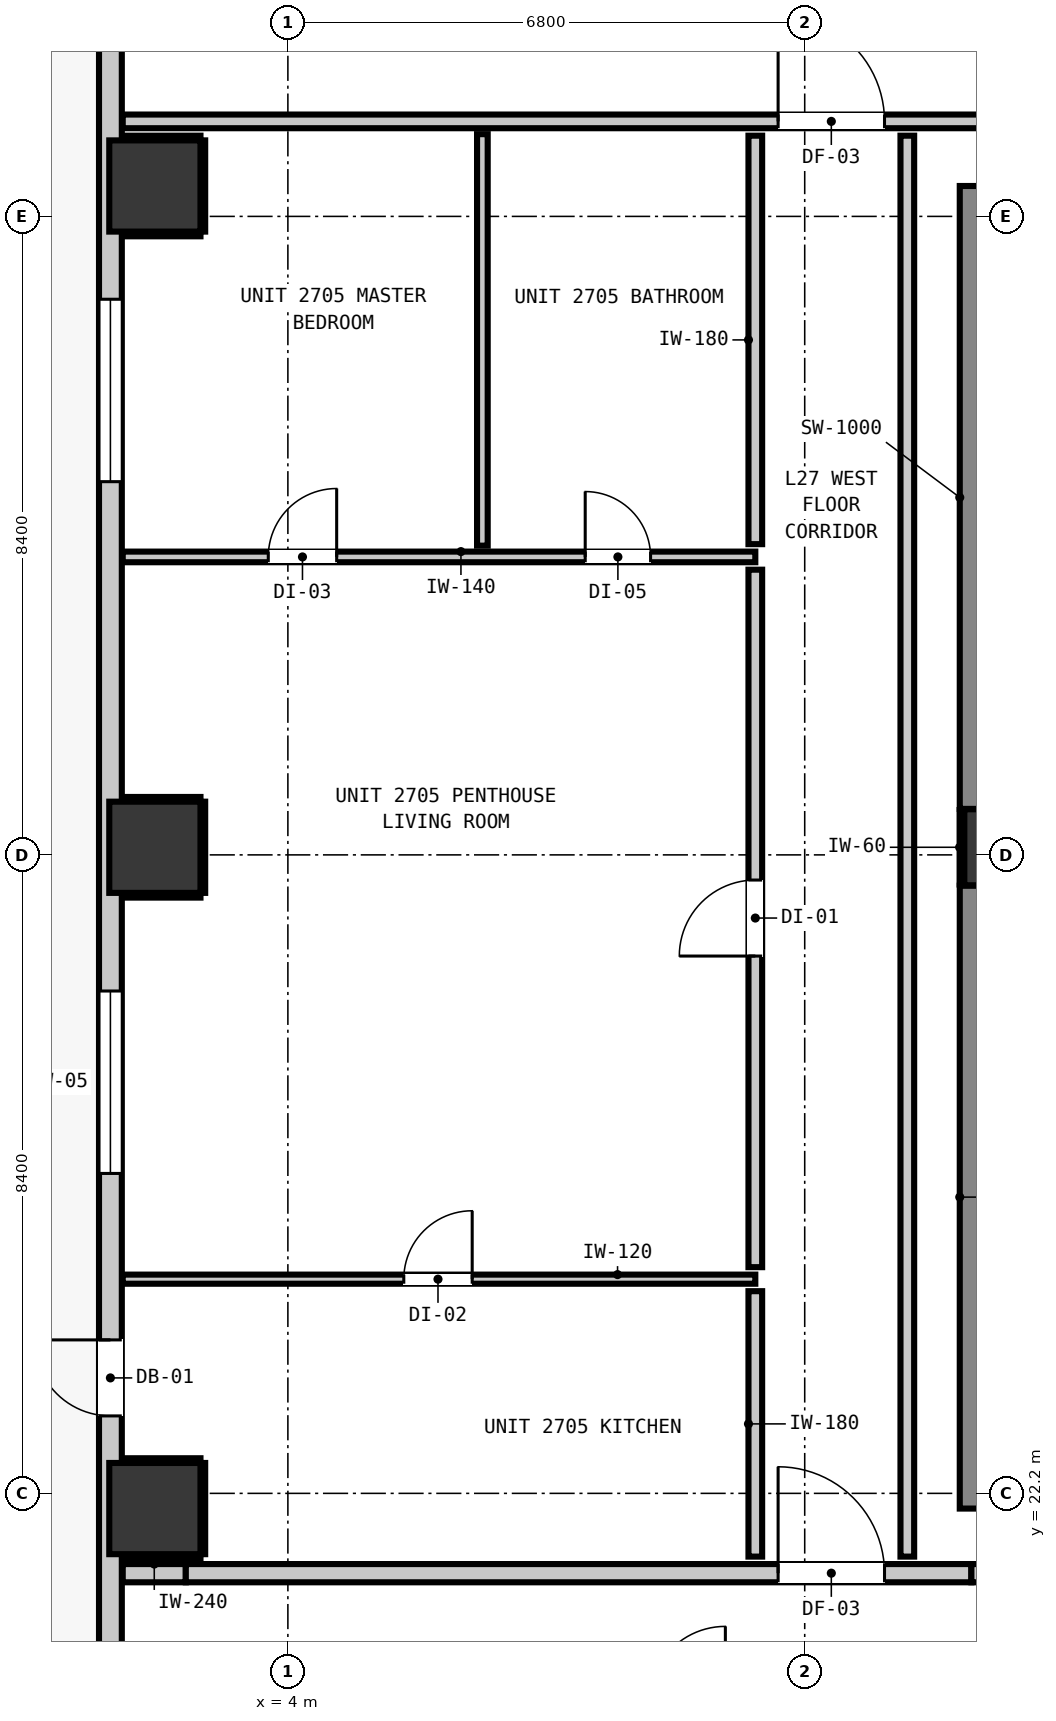
"""IFC4 building model, lengths in metres.
Left out: names, types, materials, properties, quantities, classifications, styles, units other than length and angle.
Written with IfcOpenShell. Run it as: python <this file> out.ifc"""

import sys

from ifc_helpers import new_model, si_unit, direction, frame, frame_2d, origin, origin_2d, place, context, subcontext, project, spatial, rectangle, extrude, element, fill, save


model = new_model("IFC4")
c1 = context("Model", 3, precision=1e-05, world=origin(), true_north=direction((0.0, 1.0)))
c2 = subcontext(c1, "Body", "Model", "MODEL_VIEW")
j1 = project(units=[si_unit("LENGTHUNIT", "METRE"), si_unit("PLANEANGLEUNIT", "RADIAN")], contexts=[c1])
p1 = place(None, origin())
s1 = spatial("IfcSite", under=j1, at=p1, CompositionType="ELEMENT")
p2 = place(p1, origin())
s2 = spatial("IfcBuilding", under=s1, at=p2, CompositionType="ELEMENT")
p3 = place(p2, frame((0.0, 0.0, 96.12)))
s3 = spatial("IfcBuildingStorey", under=s2, at=p3, CompositionType="ELEMENT", Elevation=96.12)
p4 = place(p3, frame((13.4, 30.7, 0.0), z_axis=(0.0, 0.0, 1.0), x_axis=(1.0, 0.0, 0.0)))
e1 = element("IfcColumn", 1, at=p4, inside=s3, PredefinedType="COLUMN", context=c2, shape_type="SweptSolid", body=[
    extrude(rectangle(XDim=1.0, YDim=1.0, at=origin_2d()), origin(), (0.0, 0.0, 1.0), 3.32),
])
p5 = place(p3, frame((13.34, 22.0, 0.0), z_axis=(0.0, 0.0, 1.0), x_axis=(0.0, 1.0, 0.0)))
e2 = element("IfcWall", 2, at=p5, inside=s3, PredefinedType="SHEAR", context=c2, shape_type="SweptSolid", body=[
    extrude(rectangle(XDim=8.195, YDim=1.0, at=frame_2d((4.098, 0.0))), origin(), (0.0, 0.0, 1.0), 3.32),
])
p6 = place(p3, frame((13.34, 31.205, 0.0), z_axis=(0.0, 0.0, 1.0), x_axis=(0.0, 1.0, 0.0)))
e3 = element("IfcWall", 3, at=p6, inside=s3, PredefinedType="SHEAR", context=c2, shape_type="SweptSolid", body=[
    extrude(rectangle(XDim=8.195, YDim=1.0, at=frame_2d((4.097, 0.0))), origin(), (0.0, 0.0, 1.0), 3.32),
])
for number, where, z_axis, x_axis in (
    (4, (2.25, 22.0, 0.0), (0.0, 0.0, 1.0), (1.0, 0.0, 0.0)),
    (5, (2.25, 30.7, 0.0), (0.0, 0.0, 1.0), (1.0, 0.0, 0.0)),
    (6, (2.25, 39.4, 0.0), (0.0, 0.0, 1.0), (1.0, 0.0, 0.0)),
):
    element("IfcColumn", number, at=place(p3, frame(where, z_axis=z_axis, x_axis=x_axis)), inside=s3, PredefinedType="COLUMN", context=c2, shape_type="SweptSolid", body=[
        extrude(rectangle(XDim=1.2, YDim=1.2, at=origin_2d()), origin(), (0.0, 0.0, 1.0), 3.32),
    ])
p7 = place(p3, frame((1.665, 16.365, 0.0), z_axis=(0.0, 0.0, 1.0), x_axis=(0.0, 1.0, 0.0)))
e7 = element("IfcWall", 7, at=p7, inside=s3, PredefinedType="STANDARD", context=c2, shape_type="SweptSolid", body=[
    extrude(rectangle(XDim=34.67, YDim=0.3, at=frame_2d((17.335, 0.0))), origin(), (0.0, 0.0, 1.0), 3.06),
])
p8 = place(p7, frame((6.854, 0.0, 0.0)))
e8 = element("IfcOpeningElement", 8, at=p8, cuts=e7, PredefinedType="OPENING", context=c2, shape_type="SweptSolid", body=[
    extrude(rectangle(XDim=1.0, YDim=2.15, at=frame_2d((0.5, 1.075))), frame((0.0, 0.16, 0.0), z_axis=(0.0, -1.0, 0.0), x_axis=(1.0, 0.0, 0.0)), (0.0, 0.0, 1.0), 0.32),
])
p9 = place(p7, frame((32.839, 0.0, 0.85)))
e9 = element("IfcOpeningElement", 9, at=p9, cuts=e7, PredefinedType="OPENING", context=c2, shape_type="SweptSolid", body=[
    extrude(rectangle(XDim=1.05, YDim=1.65, at=frame_2d((0.525, 0.825))), frame((0.0, 0.16, 0.0), z_axis=(0.0, -1.0, 0.0), x_axis=(1.0, 0.0, 0.0)), (0.0, 0.0, 1.0), 0.32),
])
p10 = place(p7, frame((10.044, 0.0, 0.85)))
e10 = element("IfcOpeningElement", 10, at=p10, cuts=e7, PredefinedType="OPENING", context=c2, shape_type="SweptSolid", body=[
    extrude(rectangle(XDim=2.4, YDim=1.95, at=frame_2d((1.2, 0.975))), frame((0.0, 0.16, 0.0), z_axis=(0.0, -1.0, 0.0), x_axis=(1.0, 0.0, 0.0)), (0.0, 0.0, 1.0), 0.32),
])
p11 = place(p7, frame((19.145, 0.0, 0.85)))
e11 = element("IfcOpeningElement", 11, at=p11, cuts=e7, PredefinedType="OPENING", context=c2, shape_type="SweptSolid", body=[
    extrude(rectangle(XDim=2.4, YDim=1.95, at=frame_2d((1.2, 0.975))), frame((0.0, 0.16, 0.0), z_axis=(0.0, -1.0, 0.0), x_axis=(1.0, 0.0, 0.0)), (0.0, 0.0, 1.0), 0.32),
])
p12 = place(p3, frame((1.827, 21.15, 0.0), z_axis=(0.0, 0.0, 1.0), x_axis=(1.0, 0.0, 0.0)))
e12 = element("IfcWall", 12, at=p12, inside=s3, PredefinedType="PARTITIONING", context=c2, shape_type="SweptSolid", body=[
    extrude(rectangle(XDim=0.83, YDim=0.24, at=frame_2d((0.415, 0.0))), origin(), (0.0, 0.0, 1.0), 3.06),
])
p13 = place(p3, frame((2.657, 21.15, 0.0), z_axis=(0.0, 0.0, 1.0), x_axis=(1.0, 0.0, 0.0)))
e13 = element("IfcWall", 13, at=p13, inside=s3, PredefinedType="PARTITIONING", context=c2, shape_type="SweptSolid", body=[
    extrude(rectangle(XDim=10.336, YDim=0.24, at=frame_2d((5.168, 0.0))), origin(), (0.0, 0.0, 1.0), 2.445),
])
p14 = place(p13, frame((7.793, 0.0, 0.0)))
e14 = element("IfcOpeningElement", 14, at=p14, cuts=e13, PredefinedType="OPENING", context=c2, shape_type="SweptSolid", body=[
    extrude(rectangle(XDim=1.4, YDim=2.15, at=frame_2d((0.7, 1.075))), frame((0.0, 0.13, 0.0), z_axis=(0.0, -1.0, 0.0), x_axis=(1.0, 0.0, 0.0)), (0.0, 0.0, 1.0), 0.26),
])
p15 = place(p3, frame((12.993, 21.15, 0.0), z_axis=(0.0, 0.0, 1.0), x_axis=(1.0, 0.0, 0.0)))
e15 = element("IfcWall", 15, at=p15, inside=s3, PredefinedType="PARTITIONING", context=c2, shape_type="SweptSolid", body=[
    extrude(rectangle(XDim=30.98, YDim=0.24, at=frame_2d((15.49, 0.0))), origin(), (0.0, 0.0, 1.0), 3.06),
])
p16 = place(p15, frame((5.217, 0.0, 0.0)))
e16 = element("IfcOpeningElement", 16, at=p16, cuts=e15, PredefinedType="OPENING", context=c2, shape_type="SweptSolid", body=[
    extrude(rectangle(XDim=1.1, YDim=2.15, at=frame_2d((0.55, 1.075))), frame((0.0, 0.13, 0.0), z_axis=(0.0, -1.0, 0.0), x_axis=(1.0, 0.0, 0.0)), (0.0, 0.0, 1.0), 0.26),
])
p17 = place(p15, frame((25.057, 0.0, 0.0)))
e17 = element("IfcOpeningElement", 17, at=p17, cuts=e15, PredefinedType="OPENING", context=c2, shape_type="SweptSolid", body=[
    extrude(rectangle(XDim=1.4, YDim=2.15, at=frame_2d((0.7, 1.075))), frame((0.0, 0.13, 0.0), z_axis=(0.0, -1.0, 0.0), x_axis=(1.0, 0.0, 0.0)), (0.0, 0.0, 1.0), 0.26),
])
p18 = place(p3, frame((1.827, 40.25, 0.0), z_axis=(0.0, 0.0, 1.0), x_axis=(1.0, 0.0, 0.0)))
e18 = element("IfcWall", 18, at=p18, inside=s3, PredefinedType="PARTITIONING", context=c2, shape_type="SweptSolid", body=[
    extrude(rectangle(XDim=42.146, YDim=0.18, at=frame_2d((21.073, 0.0))), origin(), (0.0, 0.0, 1.0), 3.06),
])
p19 = place(p18, frame((15.608, 0.0, 0.0)))
e19 = element("IfcOpeningElement", 19, at=p19, cuts=e18, PredefinedType="OPENING", context=c2, shape_type="SweptSolid", body=[
    extrude(rectangle(XDim=1.4, YDim=2.15, at=frame_2d((0.7, 1.075))), frame((0.0, 0.1, 0.0), z_axis=(0.0, -1.0, 0.0), x_axis=(1.0, 0.0, 0.0)), (0.0, 0.0, 1.0), 0.2),
])
p20 = place(p18, frame((8.623, 0.0, 0.0)))
e20 = element("IfcOpeningElement", 20, at=p20, cuts=e18, PredefinedType="OPENING", context=c2, shape_type="SweptSolid", body=[
    extrude(rectangle(XDim=1.4, YDim=2.15, at=frame_2d((0.7, 1.075))), frame((0.0, 0.1, 0.0), z_axis=(0.0, -1.0, 0.0), x_axis=(1.0, 0.0, 0.0)), (0.0, 0.0, 1.0), 0.2),
])
p21 = place(p18, frame((36.223, 0.0, 0.0)))
e21 = element("IfcOpeningElement", 21, at=p21, cuts=e18, PredefinedType="OPENING", context=c2, shape_type="SweptSolid", body=[
    extrude(rectangle(XDim=1.4, YDim=2.15, at=frame_2d((0.7, 1.075))), frame((0.0, 0.1, 0.0), z_axis=(0.0, -1.0, 0.0), x_axis=(1.0, 0.0, 0.0)), (0.0, 0.0, 1.0), 0.2),
])
p22 = place(p3, frame((1.827, 34.52, 0.0), z_axis=(0.0, 0.0, 1.0), x_axis=(1.0, 0.0, 0.0)))
e22 = element("IfcWall", 22, at=p22, inside=s3, PredefinedType="PARTITIONING", context=c2, shape_type="SweptSolid", body=[
    extrude(rectangle(XDim=8.323, YDim=0.14, at=frame_2d((4.162, 0.0))), origin(), (0.0, 0.0, 1.0), 3.06),
])
p23 = place(p22, frame((6.085, 0.0, 0.0)))
e23 = element("IfcOpeningElement", 23, at=p23, cuts=e22, PredefinedType="OPENING", context=c2, shape_type="SweptSolid", body=[
    extrude(rectangle(XDim=0.86, YDim=2.02, at=frame_2d((0.43, 1.01))), frame((0.0, 0.08, 0.0), z_axis=(0.0, -1.0, 0.0), x_axis=(1.0, 0.0, 0.0)), (0.0, 0.0, 1.0), 0.16),
])
p24 = place(p22, frame((1.915, 0.0, 0.0)))
e24 = element("IfcOpeningElement", 24, at=p24, cuts=e22, PredefinedType="OPENING", context=c2, shape_type="SweptSolid", body=[
    extrude(rectangle(XDim=0.9, YDim=2.1, at=frame_2d((0.45, 1.05))), frame((0.0, 0.08, 0.0), z_axis=(0.0, -1.0, 0.0), x_axis=(1.0, 0.0, 0.0)), (0.0, 0.0, 1.0), 0.16),
])
p25 = place(p3, frame((1.827, 25.018, 0.0), z_axis=(0.0, 0.0, 1.0), x_axis=(1.0, 0.0, 0.0)))
e25 = element("IfcWall", 25, at=p25, inside=s3, PredefinedType="PARTITIONING", context=c2, shape_type="SweptSolid", body=[
    extrude(rectangle(XDim=8.323, YDim=0.12, at=frame_2d((4.162, 0.0))), origin(), (0.0, 0.0, 1.0), 3.06),
])
p26 = place(p25, frame((3.698, 0.0, 0.0)))
e26 = element("IfcOpeningElement", 26, at=p26, cuts=e25, PredefinedType="OPENING", context=c2, shape_type="SweptSolid", body=[
    extrude(rectangle(XDim=0.9, YDim=2.1, at=frame_2d((0.45, 1.05))), frame((0.0, 0.07, 0.0), z_axis=(0.0, -1.0, 0.0), x_axis=(1.0, 0.0, 0.0)), (0.0, 0.0, 1.0), 0.14),
])
p27 = place(p3, frame((10.15, 21.368, 0.0), z_axis=(0.0, 0.0, 1.0), x_axis=(0.0, 1.0, 0.0)))
e27 = element("IfcWall", 27, at=p27, inside=s3, PredefinedType="PARTITIONING", context=c2, shape_type="SweptSolid", body=[
    extrude(rectangle(XDim=3.492, YDim=0.18, at=frame_2d((1.746, 0.0))), origin(), (0.0, 0.0, 1.0), 3.06),
])
p28 = place(p3, frame((10.15, 25.176, 0.0), z_axis=(0.0, 0.0, 1.0), x_axis=(0.0, 1.0, 0.0)))
e28 = element("IfcWall", 28, at=p28, inside=s3, PredefinedType="PARTITIONING", context=c2, shape_type="SweptSolid", body=[
    extrude(rectangle(XDim=9.176, YDim=0.18, at=frame_2d((4.588, 0.0))), origin(), (0.0, 0.0, 1.0), 3.06),
])
p29 = place(p28, frame((4.093, 0.0, 0.0)))
e29 = element("IfcOpeningElement", 29, at=p29, cuts=e28, PredefinedType="OPENING", context=c2, shape_type="SweptSolid", body=[
    extrude(rectangle(XDim=1.0, YDim=2.15, at=frame_2d((0.5, 1.075))), frame((0.0, 0.1, 0.0), z_axis=(0.0, -1.0, 0.0), x_axis=(1.0, 0.0, 0.0)), (0.0, 0.0, 1.0), 0.2),
])
p30 = place(p3, frame((10.15, 34.688, 0.0), z_axis=(0.0, 0.0, 1.0), x_axis=(0.0, 1.0, 0.0)))
e30 = element("IfcWall", 30, at=p30, inside=s3, PredefinedType="PARTITIONING", context=c2, shape_type="SweptSolid", body=[
    extrude(rectangle(XDim=5.374, YDim=0.18, at=frame_2d((2.687, 0.0))), origin(), (0.0, 0.0, 1.0), 3.06),
])
p31 = place(p3, frame((12.15, 21.368, 0.0), z_axis=(0.0, 0.0, 1.0), x_axis=(0.0, 1.0, 0.0)))
e31 = element("IfcWall", 31, at=p31, inside=s3, PredefinedType="PARTITIONING", context=c2, shape_type="SweptSolid", body=[
    extrude(rectangle(XDim=18.694, YDim=0.18, at=frame_2d((9.347, 0.0))), origin(), (0.0, 0.0, 1.0), 3.06),
])
p32 = place(p3, frame((6.559, 34.668, 0.0), z_axis=(0.0, 0.0, 1.0), x_axis=(0.0, 1.0, 0.0)))
e32 = element("IfcWall", 32, at=p32, inside=s3, PredefinedType="PARTITIONING", context=c2, shape_type="SweptSolid", body=[
    extrude(rectangle(XDim=5.414, YDim=0.14, at=frame_2d((2.707, 0.0))), origin(), (0.0, 0.0, 1.0), 3.06),
])
p33 = place(p3, frame((12.868, 30.21, 0.0), z_axis=(0.0, 0.0, 1.0), x_axis=(0.0, 1.0, 0.0)))
e33 = element("IfcWall", 33, at=p33, inside=s3, PredefinedType="PARTITIONING", context=c2, shape_type="SweptSolid", body=[
    extrude(rectangle(XDim=0.98, YDim=0.06, at=frame_2d((0.49, 0.0))), origin(), (0.0, 0.0, 1.0), 1.45),
])
for number, where, z_axis, x_axis in (
    (34, (1.83, 21.368, 0.0), (0.0, 0.0, 1.0), (1.0, 0.0, 0.0)),
    (35, (1.83, 22.632, 0.0), (0.0, 0.0, 1.0), (1.0, 0.0, 0.0)),
):
    element("IfcWall", number, at=place(p3, frame(where, z_axis=z_axis, x_axis=x_axis)), inside=s3, PredefinedType="PARTITIONING", context=c2, shape_type="SweptSolid", body=[
        extrude(rectangle(XDim=1.02, YDim=0.06, at=frame_2d((0.51, 0.0))), origin(), (0.0, 0.0, 1.0), 1.45),
    ])
p34 = place(p3, frame((2.882, 21.4, 0.0), z_axis=(0.0, 0.0, 1.0), x_axis=(0.0, 1.0, 0.0)))
e36 = element("IfcWall", 36, at=p34, inside=s3, PredefinedType="PARTITIONING", context=c2, shape_type="SweptSolid", body=[
    extrude(rectangle(XDim=1.2, YDim=0.06, at=frame_2d((0.6, 0.0))), origin(), (0.0, 0.0, 1.0), 1.45),
])
for number, where, z_axis, x_axis in (
    (37, (1.83, 30.068, 0.0), (0.0, 0.0, 1.0), (1.0, 0.0, 0.0)),
    (38, (1.83, 31.332, 0.0), (0.0, 0.0, 1.0), (1.0, 0.0, 0.0)),
):
    element("IfcWall", number, at=place(p3, frame(where, z_axis=z_axis, x_axis=x_axis)), inside=s3, PredefinedType="PARTITIONING", context=c2, shape_type="SweptSolid", body=[
        extrude(rectangle(XDim=1.02, YDim=0.06, at=frame_2d((0.51, 0.0))), origin(), (0.0, 0.0, 1.0), 1.45),
    ])
p35 = place(p3, frame((2.882, 30.1, 0.0), z_axis=(0.0, 0.0, 1.0), x_axis=(0.0, 1.0, 0.0)))
e39 = element("IfcWall", 39, at=p35, inside=s3, PredefinedType="PARTITIONING", context=c2, shape_type="SweptSolid", body=[
    extrude(rectangle(XDim=1.2, YDim=0.06, at=frame_2d((0.6, 0.0))), origin(), (0.0, 0.0, 1.0), 1.45),
])
for number, where, z_axis, x_axis in (
    (40, (1.83, 38.768, 0.0), (0.0, 0.0, 1.0), (1.0, 0.0, 0.0)),
    (41, (1.83, 40.032, 0.0), (0.0, 0.0, 1.0), (1.0, 0.0, 0.0)),
):
    element("IfcWall", number, at=place(p3, frame(where, z_axis=z_axis, x_axis=x_axis)), inside=s3, PredefinedType="PARTITIONING", context=c2, shape_type="SweptSolid", body=[
        extrude(rectangle(XDim=1.02, YDim=0.06, at=frame_2d((0.51, 0.0))), origin(), (0.0, 0.0, 1.0), 1.45),
    ])
p36 = place(p3, frame((2.882, 38.8, 0.0), z_axis=(0.0, 0.0, 1.0), x_axis=(0.0, 1.0, 0.0)))
e42 = element("IfcWall", 42, at=p36, inside=s3, PredefinedType="PARTITIONING", context=c2, shape_type="SweptSolid", body=[
    extrude(rectangle(XDim=1.2, YDim=0.06, at=frame_2d((0.6, 0.0))), origin(), (0.0, 0.0, 1.0), 1.45),
])
p37 = place(p8, origin())
e43 = element("IfcDoor", 43, at=p37, inside=s3, OperationType="SINGLE_SWING_RIGHT", PredefinedType="DOOR", context=c2, shape_type="SweptSolid", body=[
    extrude(rectangle(XDim=1.0, YDim=2.15, at=frame_2d((0.5, 1.075))), frame((0.0, 0.025, 0.0), z_axis=(0.0, -1.0, 0.0), x_axis=(1.0, 0.0, 0.0)), (0.0, 0.0, 1.0), 0.05),
])
fill(e8, e43)
p38 = place(p10, origin())
e44 = element("IfcWindow", 44, at=p38, inside=s3, PartitioningType="SINGLE_PANEL", PredefinedType="WINDOW", context=c2, shape_type="SweptSolid", body=[
    extrude(rectangle(XDim=2.4, YDim=1.95, at=frame_2d((1.2, 0.975))), frame((0.0, 0.03, 0.0), z_axis=(0.0, -1.0, 0.0), x_axis=(1.0, 0.0, 0.0)), (0.0, 0.0, 1.0), 0.06),
])
fill(e10, e44)
p39 = place(p11, origin())
e45 = element("IfcWindow", 45, at=p39, inside=s3, PartitioningType="SINGLE_PANEL", PredefinedType="WINDOW", context=c2, shape_type="SweptSolid", body=[
    extrude(rectangle(XDim=2.4, YDim=1.95, at=frame_2d((1.2, 0.975))), frame((0.0, 0.03, 0.0), z_axis=(0.0, -1.0, 0.0), x_axis=(1.0, 0.0, 0.0)), (0.0, 0.0, 1.0), 0.06),
])
fill(e11, e45)
p40 = place(p14, origin())
e46 = element("IfcDoor", 46, at=p40, inside=s3, OperationType="SINGLE_SWING_LEFT", PredefinedType="DOOR", context=c2, shape_type="SweptSolid", body=[
    extrude(rectangle(XDim=1.4, YDim=2.15, at=frame_2d((0.7, 1.075))), frame((0.0, 0.025, 0.0), z_axis=(0.0, -1.0, 0.0), x_axis=(1.0, 0.0, 0.0)), (0.0, 0.0, 1.0), 0.05),
])
fill(e14, e46)
p41 = place(p20, origin())
e47 = element("IfcDoor", 47, at=p41, inside=s3, OperationType="SINGLE_SWING_LEFT", PredefinedType="DOOR", context=c2, shape_type="SweptSolid", body=[
    extrude(rectangle(XDim=1.4, YDim=2.15, at=frame_2d((0.7, 1.075))), frame((0.0, 0.025, 0.0), z_axis=(0.0, -1.0, 0.0), x_axis=(1.0, 0.0, 0.0)), (0.0, 0.0, 1.0), 0.05),
])
fill(e20, e47)
p42 = place(p29, origin())
e48 = element("IfcDoor", 48, at=p42, inside=s3, OperationType="SINGLE_SWING_LEFT", PredefinedType="DOOR", context=c2, shape_type="SweptSolid", body=[
    extrude(rectangle(XDim=1.0, YDim=2.15, at=frame_2d((0.5, 1.075))), frame((0.0, 0.025, 0.0), z_axis=(0.0, -1.0, 0.0), x_axis=(1.0, 0.0, 0.0)), (0.0, 0.0, 1.0), 0.05),
])
fill(e29, e48)
p43 = place(p26, origin())
e49 = element("IfcDoor", 49, at=p43, inside=s3, OperationType="SINGLE_SWING_RIGHT", PredefinedType="DOOR", context=c2, shape_type="SweptSolid", body=[
    extrude(rectangle(XDim=0.9, YDim=2.1, at=frame_2d((0.45, 1.05))), frame((0.0, 0.025, 0.0), z_axis=(0.0, -1.0, 0.0), x_axis=(1.0, 0.0, 0.0)), (0.0, 0.0, 1.0), 0.05),
])
fill(e26, e49)
p44 = place(p23, origin())
e50 = element("IfcDoor", 50, at=p44, inside=s3, OperationType="SINGLE_SWING_LEFT", PredefinedType="DOOR", context=c2, shape_type="SweptSolid", body=[
    extrude(rectangle(XDim=0.86, YDim=2.02, at=frame_2d((0.43, 1.01))), frame((0.0, 0.025, 0.0), z_axis=(0.0, -1.0, 0.0), x_axis=(1.0, 0.0, 0.0)), (0.0, 0.0, 1.0), 0.05),
])
fill(e23, e50)
p45 = place(p24, origin())
e51 = element("IfcDoor", 51, at=p45, inside=s3, OperationType="SINGLE_SWING_RIGHT", PredefinedType="DOOR", context=c2, shape_type="SweptSolid", body=[
    extrude(rectangle(XDim=0.9, YDim=2.1, at=frame_2d((0.45, 1.05))), frame((0.0, 0.025, 0.0), z_axis=(0.0, -1.0, 0.0), x_axis=(1.0, 0.0, 0.0)), (0.0, 0.0, 1.0), 0.05),
])
fill(e24, e51)
save(model, sys.argv[1])
